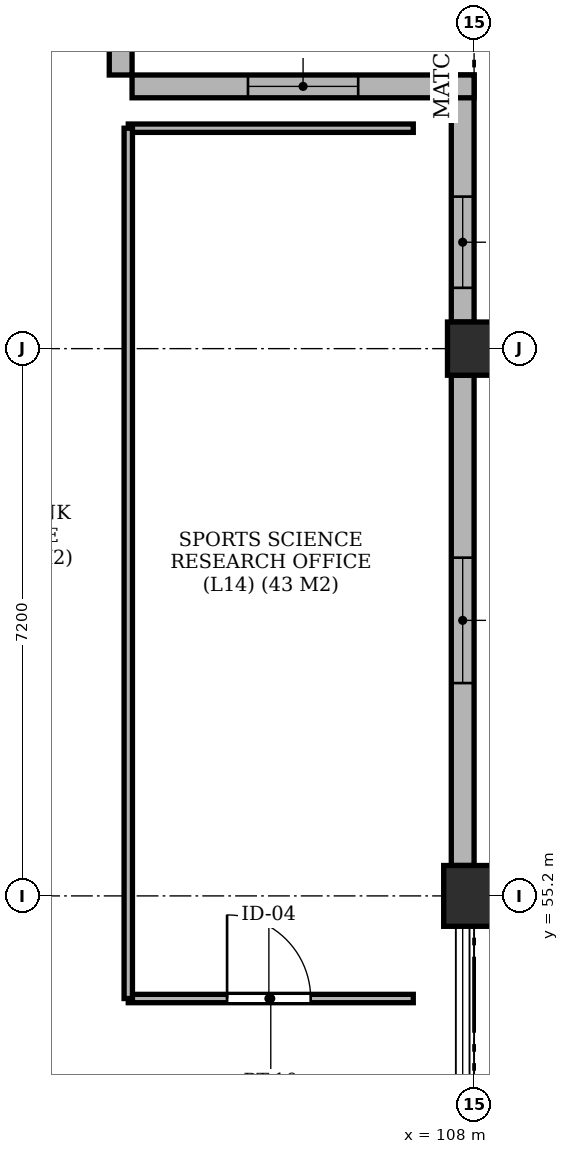
"""IFC4 building model, lengths in metres.
Left out: names, types, materials, properties, quantities, classifications, styles, units other than length and angle.
Written with IfcOpenShell. Run it as: python <this file> out.ifc"""

import sys

from ifc_helpers import new_model, si_unit, direction, frame, frame_2d, origin, origin_2d, place, context, subcontext, project, spatial, rectangle, extrude, element, fill, save


model = new_model("IFC4")
c1 = context("Model", 3, precision=1e-05, world=origin(), true_north=direction((0.0, 1.0)))
c2 = subcontext(c1, "Body", "Model", "MODEL_VIEW")
j1 = project(units=[si_unit("LENGTHUNIT", "METRE"), si_unit("PLANEANGLEUNIT", "RADIAN")], contexts=[c1])
p1 = place(None, origin())
s1 = spatial("IfcSite", under=j1, at=p1, CompositionType="ELEMENT")
p2 = place(p1, origin())
s2 = spatial("IfcBuilding", under=s1, at=p2, CompositionType="ELEMENT")
p3 = place(p2, frame((0.0, 0.0, 56.8)))
s3 = spatial("IfcBuildingStorey", under=s2, at=p3, CompositionType="ELEMENT", Elevation=56.8)
p4 = place(p3, frame((108.0, 55.2, -0.22), z_axis=(0.0, 0.0, 1.0), x_axis=(1.0, 0.0, 0.0)))
e1 = element("IfcColumn", 1, at=p4, inside=s3, PredefinedType="COLUMN", context=c2, shape_type="SweptSolid", body=[
    extrude(rectangle(XDim=0.8, YDim=0.8, at=origin_2d()), origin(), (0.0, 0.0, 1.0), 3.26),
])
p5 = place(p3, frame((108.0, 62.4, -0.22), z_axis=(0.0, 0.0, 1.0), x_axis=(1.0, 0.0, 0.0)))
e2 = element("IfcColumn", 2, at=p5, inside=s3, PredefinedType="COLUMN", context=c2, shape_type="SweptSolid", body=[
    extrude(rectangle(XDim=0.7, YDim=0.7, at=origin_2d()), origin(), (0.0, 0.0, 1.0), 3.26),
])
p6 = place(p3, frame((107.85, 55.6, 0.0), z_axis=(0.0, 0.0, 1.0), x_axis=(0.0, 1.0, 0.0)))
e3 = element("IfcWall", 3, at=p6, inside=s3, PredefinedType="SOLIDWALL", context=c2, shape_type="SweptSolid", body=[
    extrude(rectangle(XDim=6.45, YDim=0.3, at=frame_2d((3.225, 0.0))), origin(), (0.0, 0.0, 1.0), 2.53),
])
p7 = place(p6, frame((2.4, 0.0, 0.62)))
e4 = element("IfcOpeningElement", 4, at=p7, cuts=e3, PredefinedType="OPENING", context=c2, shape_type="SweptSolid", body=[
    extrude(rectangle(XDim=1.65, YDim=1.81, at=frame_2d((0.825, 0.905))), frame((0.0, 0.162, 0.0), z_axis=(0.0, -1.0, 0.0), x_axis=(1.0, 0.0, 0.0)), (0.0, 0.0, 1.0), 0.324),
])
p8 = place(p3, frame((107.85, 62.75, 0.0), z_axis=(0.0, 0.0, 1.0), x_axis=(0.0, 1.0, 0.0)))
e5 = element("IfcWall", 5, at=p8, inside=s3, PredefinedType="SOLIDWALL", context=c2, shape_type="SweptSolid", body=[
    extrude(rectangle(XDim=3.25, YDim=0.3, at=frame_2d((1.625, 0.0))), origin(), (0.0, 0.0, 1.0), 2.53),
])
p9 = place(p8, frame((0.45, 0.0, 0.62)))
e6 = element("IfcOpeningElement", 6, at=p9, cuts=e5, PredefinedType="OPENING", context=c2, shape_type="SweptSolid", body=[
    extrude(rectangle(XDim=1.2, YDim=1.65, at=frame_2d((0.6, 0.825))), frame((0.0, 0.162, 0.0), z_axis=(0.0, -1.0, 0.0), x_axis=(1.0, 0.0, 0.0)), (0.0, 0.0, 1.0), 0.324),
])
p10 = place(p3, frame((108.0, 65.85, 0.0), z_axis=(0.0, 0.0, 1.0), x_axis=(-1.0, 0.0, 0.0)))
e7 = element("IfcWall", 7, at=p10, inside=s3, PredefinedType="SOLIDWALL", context=c2, shape_type="SweptSolid", body=[
    extrude(rectangle(XDim=4.5, YDim=0.3, at=frame_2d((2.25, 0.0))), origin(), (0.0, 0.0, 1.0), 2.53),
])
p11 = place(p10, frame((1.525, 0.0, 0.62)))
e8 = element("IfcOpeningElement", 8, at=p11, cuts=e7, PredefinedType="OPENING", context=c2, shape_type="SweptSolid", body=[
    extrude(rectangle(XDim=1.45, YDim=1.81, at=frame_2d((0.725, 0.905))), frame((0.0, 0.162, 0.0), z_axis=(0.0, -1.0, 0.0), x_axis=(1.0, 0.0, 0.0)), (0.0, 0.0, 1.0), 0.324),
])
p12 = place(p3, frame((103.35, 66.0, 0.0), z_axis=(0.0, 0.0, 1.0), x_axis=(0.0, 1.0, 0.0)))
e9 = element("IfcWall", 9, at=p12, inside=s3, PredefinedType="SOLIDWALL", context=c2, shape_type="SweptSolid", body=[
    extrude(rectangle(XDim=3.6, YDim=0.3, at=frame_2d((1.8, 0.0))), origin(), (0.0, 0.0, 1.0), 2.53),
])
p13 = place(p12, frame((1.125, 0.0, 0.62)))
e10 = element("IfcOpeningElement", 10, at=p13, cuts=e9, PredefinedType="OPENING", context=c2, shape_type="SweptSolid", body=[
    extrude(rectangle(XDim=1.35, YDim=1.8, at=frame_2d((0.675, 0.9))), frame((0.0, 0.162, 0.0), z_axis=(0.0, -1.0, 0.0), x_axis=(1.0, 0.0, 0.0)), (0.0, 0.0, 1.0), 0.324),
])
p14 = place(p3, frame((103.45, 53.85, 0.0), z_axis=(0.0, 0.0, 1.0), x_axis=(1.0, 0.0, 0.0)))
e11 = element("IfcWall", 11, at=p14, inside=s3, PredefinedType="PARTITIONING", context=c2, shape_type="SweptSolid", body=[
    extrude(rectangle(XDim=3.75, YDim=0.11, at=frame_2d((1.875, 0.0))), origin(), (0.0, 0.0, 1.0), 2.53),
])
p15 = place(p14, frame((1.3, 0.0, 0.0)))
e12 = element("IfcOpeningElement", 12, at=p15, cuts=e11, PredefinedType="OPENING", context=c2, shape_type="SweptSolid", body=[
    extrude(rectangle(XDim=1.1, YDim=2.15, at=frame_2d((0.55, 1.075))), frame((0.0, 0.067, 0.0), z_axis=(0.0, -1.0, 0.0), x_axis=(1.0, 0.0, 0.0)), (0.0, 0.0, 1.0), 0.134),
])
p16 = place(p3, frame((103.45, 65.3, 0.0), z_axis=(0.0, 0.0, 1.0), x_axis=(1.0, 0.0, 0.0)))
e13 = element("IfcWall", 13, at=p16, inside=s3, PredefinedType="PARTITIONING", context=c2, shape_type="SweptSolid", body=[
    extrude(rectangle(XDim=3.75, YDim=0.11, at=frame_2d((1.875, 0.0))), origin(), (0.0, 0.0, 1.0), 2.53),
])
p17 = place(p3, frame((103.45, 53.85, 0.0), z_axis=(0.0, 0.0, 1.0), x_axis=(0.0, 1.0, 0.0)))
e14 = element("IfcWall", 14, at=p17, inside=s3, PredefinedType="PARTITIONING", context=c2, shape_type="SweptSolid", body=[
    extrude(rectangle(XDim=11.45, YDim=0.11, at=frame_2d((5.725, 0.0))), origin(), (0.0, 0.0, 1.0), 2.53),
])
p18 = place(p7, origin())
e15 = element("IfcWindow", 15, at=p18, inside=s3, PartitioningType="SINGLE_PANEL", PredefinedType="WINDOW", context=c2, shape_type="SweptSolid", body=[
    extrude(rectangle(XDim=1.65, YDim=1.81, at=frame_2d((0.825, 0.905))), frame((0.0, 0.03, 0.0), z_axis=(0.0, -1.0, 0.0), x_axis=(1.0, 0.0, 0.0)), (0.0, 0.0, 1.0), 0.06),
])
fill(e4, e15)
p19 = place(p9, origin())
e16 = element("IfcWindow", 16, at=p19, inside=s3, PartitioningType="SINGLE_PANEL", PredefinedType="WINDOW", context=c2, shape_type="SweptSolid", body=[
    extrude(rectangle(XDim=1.2, YDim=1.65, at=frame_2d((0.6, 0.825))), frame((0.0, 0.03, 0.0), z_axis=(0.0, -1.0, 0.0), x_axis=(1.0, 0.0, 0.0)), (0.0, 0.0, 1.0), 0.06),
])
fill(e6, e16)
p20 = place(p11, origin())
e17 = element("IfcWindow", 17, at=p20, inside=s3, PartitioningType="SINGLE_PANEL", PredefinedType="WINDOW", context=c2, shape_type="SweptSolid", body=[
    extrude(rectangle(XDim=1.45, YDim=1.81, at=frame_2d((0.725, 0.905))), frame((0.0, 0.03, 0.0), z_axis=(0.0, -1.0, 0.0), x_axis=(1.0, 0.0, 0.0)), (0.0, 0.0, 1.0), 0.06),
])
fill(e8, e17)
p21 = place(p15, origin())
e18 = element("IfcDoor", 18, at=p21, inside=s3, OperationType="SINGLE_SWING_LEFT", PredefinedType="DOOR", context=c2, shape_type="SweptSolid", body=[
    extrude(rectangle(XDim=1.1, YDim=2.15, at=frame_2d((0.55, 1.075))), frame((0.0, 0.025, 0.0), z_axis=(0.0, -1.0, 0.0), x_axis=(1.0, 0.0, 0.0)), (0.0, 0.0, 1.0), 0.05),
])
fill(e12, e18)
save(model, sys.argv[1])
